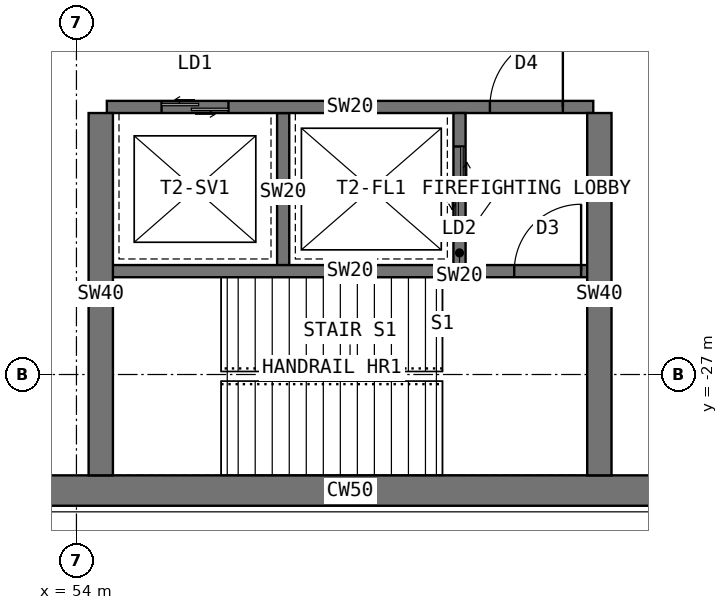
"""IFC4 building model, lengths in metres.
Left out: names, types, materials, properties, quantities, classifications, styles, units other than length and angle.
Written with IfcOpenShell. Run it as: python <this file> out.ifc"""

import sys

from ifc_helpers import new_model, si_unit, direction, frame, frame_2d, origin, place, context, subcontext, project, spatial, rectangle, extrude, element, fill, save


model = new_model("IFC4")
c1 = context("Model", 3, precision=1e-05, world=origin(), true_north=direction((0.0, 1.0)))
c2 = subcontext(c1, "Body", "Model", "MODEL_VIEW")
j1 = project(units=[si_unit("LENGTHUNIT", "METRE"), si_unit("PLANEANGLEUNIT", "RADIAN")], contexts=[c1])
p1 = place(None, origin())
s1 = spatial("IfcSite", under=j1, at=p1, CompositionType="ELEMENT")
p2 = place(p1, origin())
s2 = spatial("IfcBuilding", under=s1, at=p2, CompositionType="ELEMENT")
p3 = place(p2, frame((0.0, 0.0, 238.5)))
s3 = spatial("IfcBuildingStorey", under=s2, at=p3, CompositionType="ELEMENT", Elevation=238.5)
p4 = place(p3, frame((52.202, -28.908, 0.0), z_axis=(0.0, 0.0, 1.0), x_axis=(1.0, 0.0, 0.0)))
e1 = element("IfcWall", 1, at=p4, inside=s3, PredefinedType="SHEAR", context=c2, shape_type="SweptSolid", body=[
    extrude(rectangle(XDim=12.596, YDim=0.5, at=frame_2d((6.298, 0.0))), origin(), (0.0, 0.0, 1.0), 5.0),
])
p5 = place(p3, frame((54.5, -22.6, 0.0), z_axis=(0.0, 0.0, 1.0), x_axis=(1.0, 0.0, 0.0)))
e2 = element("IfcWall", 2, at=p5, inside=s3, PredefinedType="SHEAR", context=c2, shape_type="SweptSolid", body=[
    extrude(rectangle(XDim=8.0, YDim=0.2, at=frame_2d((4.0, 0.0))), origin(), (0.0, 0.0, 1.0), 5.0),
])
p6 = place(p5, frame((6.3, 0.0, 0.0)))
e3 = element("IfcOpeningElement", 3, at=p6, cuts=e2, PredefinedType="OPENING", context=c2, shape_type="SweptSolid", body=[
    extrude(rectangle(XDim=1.2, YDim=2.1, at=frame_2d((0.6, 1.05))), frame((0.0, 0.11, 0.0), z_axis=(0.0, -1.0, 0.0), x_axis=(1.0, 0.0, 0.0)), (0.0, 0.0, 1.0), 0.22),
])
p7 = place(p5, frame((0.9, 0.0, 0.0)))
e4 = element("IfcOpeningElement", 4, at=p7, cuts=e2, PredefinedType="OPENING", context=c2, shape_type="SweptSolid", body=[
    extrude(rectangle(XDim=1.1, YDim=2.2, at=frame_2d((0.55, 1.1))), frame((0.0, 0.11, 0.0), z_axis=(0.0, -1.0, 0.0), x_axis=(1.0, 0.0, 0.0)), (0.0, 0.0, 1.0), 0.22),
])
p8 = place(p3, frame((57.4, -22.7, 0.0), z_axis=(0.0, 0.0, 1.0), x_axis=(0.0, -1.0, 0.0)))
e5 = element("IfcWall", 5, at=p8, inside=s3, PredefinedType="SHEAR", context=c2, shape_type="SweptSolid", body=[
    extrude(rectangle(XDim=2.6, YDim=0.2, at=frame_2d((1.3, 0.0))), origin(), (0.0, 0.0, 1.0), 5.0),
])
p9 = place(p3, frame((60.3, -22.7, 0.0), z_axis=(0.0, 0.0, 1.0), x_axis=(0.0, -1.0, 0.0)))
e6 = element("IfcWall", 6, at=p9, inside=s3, PredefinedType="SHEAR", context=c2, shape_type="SweptSolid", body=[
    extrude(rectangle(XDim=2.6, YDim=0.2, at=frame_2d((1.3, 0.0))), origin(), (0.0, 0.0, 1.0), 5.0),
])
p10 = place(p9, frame((0.55, 0.0, 0.0)))
e7 = element("IfcOpeningElement", 7, at=p10, cuts=e6, PredefinedType="OPENING", context=c2, shape_type="SweptSolid", body=[
    extrude(rectangle(XDim=1.3, YDim=2.2, at=frame_2d((0.65, 1.1))), frame((0.0, 0.11, 0.0), z_axis=(0.0, -1.0, 0.0), x_axis=(1.0, 0.0, 0.0)), (0.0, 0.0, 1.0), 0.22),
])
p11 = place(p3, frame((54.5, -25.3, 0.0), z_axis=(0.0, 0.0, 1.0), x_axis=(1.0, 0.0, 0.0)))
e8 = element("IfcWall", 8, at=p11, inside=s3, PredefinedType="SHEAR", context=c2, shape_type="SweptSolid", body=[
    extrude(rectangle(XDim=8.0, YDim=0.2, at=frame_2d((4.0, 0.0))), origin(), (0.0, 0.0, 1.0), 5.0),
])
p12 = place(p11, frame((6.7, 0.0, 0.0)))
e9 = element("IfcOpeningElement", 9, at=p12, cuts=e8, PredefinedType="OPENING", context=c2, shape_type="SweptSolid", body=[
    extrude(rectangle(XDim=1.1, YDim=2.1, at=frame_2d((0.55, 1.05))), frame((0.0, 0.11, 0.0), z_axis=(0.0, -1.0, 0.0), x_axis=(1.0, 0.0, 0.0)), (0.0, 0.0, 1.0), 0.22),
])
for number, where, z_axis, x_axis in (
    (10, (62.6, -22.7, 0.0), (0.0, 0.0, 1.0), (0.0, -1.0, 0.0)),
    (11, (54.4, -22.7, 0.0), (0.0, 0.0, 1.0), (0.0, -1.0, 0.0)),
):
    element("IfcWall", number, at=place(p3, frame(where, z_axis=z_axis, x_axis=x_axis)), inside=s3, PredefinedType="SHEAR", context=c2, shape_type="SweptSolid", body=[
        extrude(rectangle(XDim=5.958, YDim=0.4, at=frame_2d((2.979, 0.0))), origin(), (0.0, 0.0, 1.0), 5.0),
    ])
p13 = place(p6, origin())
e12 = element("IfcDoor", 12, at=p13, inside=s3, OperationType="SINGLE_SWING_RIGHT", PredefinedType="DOOR", context=c2, shape_type="SweptSolid", body=[
    extrude(rectangle(XDim=1.2, YDim=2.1, at=frame_2d((0.6, 1.05))), frame((0.0, 0.025, 0.0), z_axis=(0.0, -1.0, 0.0), x_axis=(1.0, 0.0, 0.0)), (0.0, 0.0, 1.0), 0.05),
])
fill(e3, e12)
p14 = place(p10, origin())
e13 = element("IfcDoor", 13, at=p14, inside=s3, OperationType="DOUBLE_DOOR_SLIDING", PredefinedType="DOOR", context=c2, shape_type="SweptSolid", body=[
    extrude(rectangle(XDim=1.3, YDim=2.2, at=frame_2d((0.65, 1.1))), frame((0.0, 0.025, 0.0), z_axis=(0.0, -1.0, 0.0), x_axis=(1.0, 0.0, 0.0)), (0.0, 0.0, 1.0), 0.05),
])
fill(e7, e13)
p15 = place(p7, origin())
e14 = element("IfcDoor", 14, at=p15, inside=s3, OperationType="DOUBLE_DOOR_SLIDING", PredefinedType="DOOR", context=c2, shape_type="SweptSolid", body=[
    extrude(rectangle(XDim=1.1, YDim=2.2, at=frame_2d((0.55, 1.1))), frame((0.0, 0.025, 0.0), z_axis=(0.0, -1.0, 0.0), x_axis=(1.0, 0.0, 0.0)), (0.0, 0.0, 1.0), 0.05),
])
fill(e4, e14)
p16 = place(p12, origin())
e15 = element("IfcDoor", 15, at=p16, inside=s3, OperationType="SINGLE_SWING_RIGHT", PredefinedType="DOOR", context=c2, shape_type="SweptSolid", body=[
    extrude(rectangle(XDim=1.1, YDim=2.1, at=frame_2d((0.55, 1.05))), frame((0.0, 0.025, 0.0), z_axis=(0.0, -1.0, 0.0), x_axis=(1.0, 0.0, 0.0)), (0.0, 0.0, 1.0), 0.05),
])
fill(e9, e15)
save(model, sys.argv[1])
